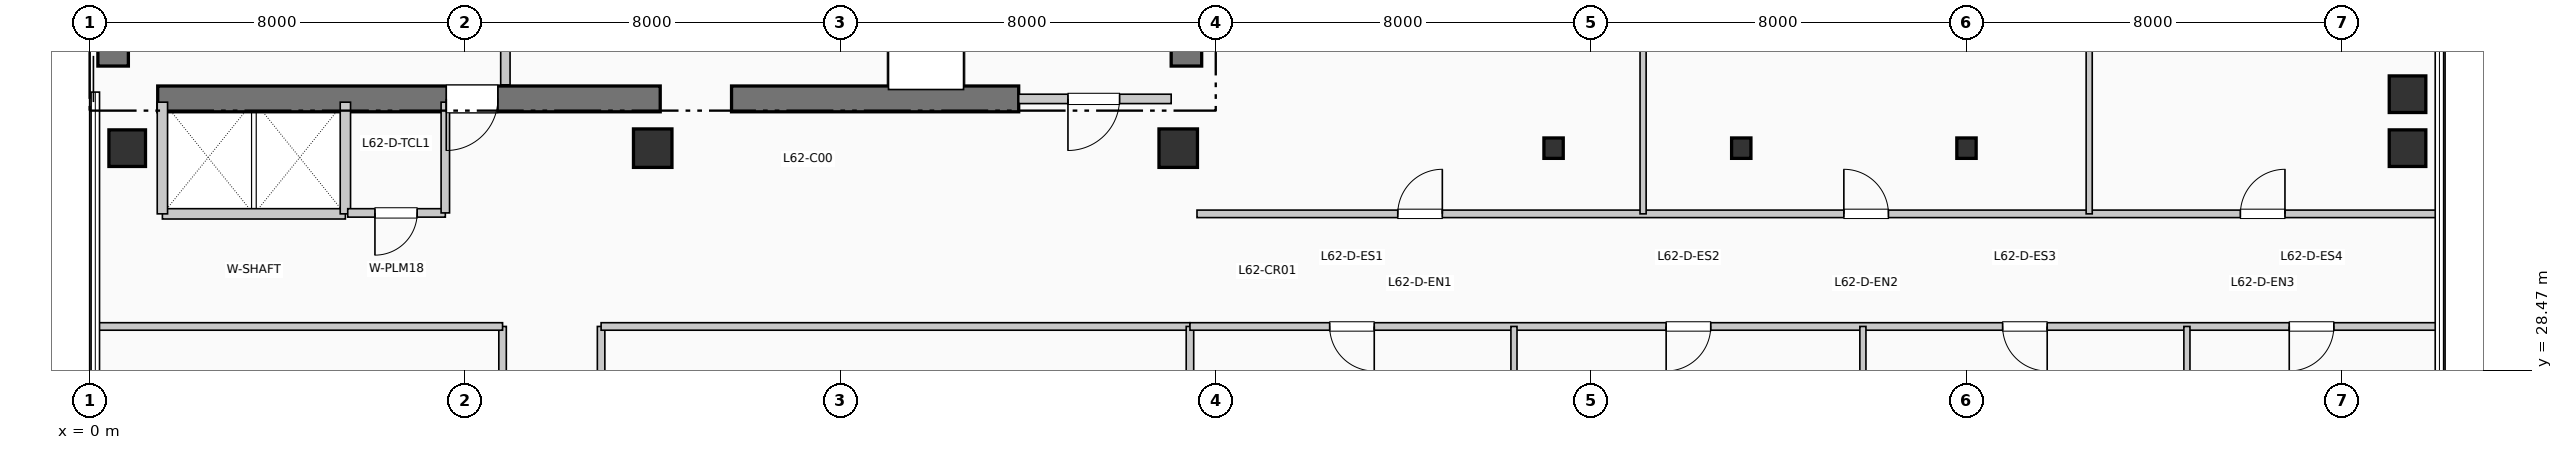
"""IFC4 building model, lengths in metres.
Left out: names, types, materials, properties, quantities, classifications, styles, units other than length and angle.
Written with IfcOpenShell. Run it as: python <this file> out.ifc"""

import sys

from ifc_helpers import new_model, si_unit, direction, frame, frame_2d, origin, origin_2d, place, context, subcontext, project, spatial, rectangle, i_section, extrude, element, fill, save


model = new_model("IFC4")
c1 = context("Model", 3, precision=1e-05, world=origin(), true_north=direction((0.0, 1.0)))
c2 = subcontext(c1, "Body", "Model", "MODEL_VIEW")
j1 = project(units=[si_unit("LENGTHUNIT", "METRE"), si_unit("PLANEANGLEUNIT", "RADIAN")], contexts=[c1])
p1 = place(None, origin())
s1 = spatial("IfcSite", under=j1, at=p1, CompositionType="ELEMENT")
p2 = place(p1, origin())
s2 = spatial("IfcBuilding", under=s1, at=p2, CompositionType="ELEMENT")
p3 = place(p2, frame((0.0, 0.0, 256.41)))
s3 = spatial("IfcBuildingStorey", under=s2, at=p3, CompositionType="ELEMENT", Elevation=256.41)
p4 = place(p3, frame((0.5, 34.95, 0.0), z_axis=(0.0, 0.0, 1.0), x_axis=(0.0, 1.0, 0.0)))
e1 = element("IfcWall", 1, at=p4, inside=s3, PredefinedType="SHEAR", context=c2, shape_type="SweptSolid", body=[
    extrude(rectangle(XDim=7.9, YDim=0.65, at=frame_2d((3.95, 0.0))), origin(), (0.0, 0.0, 1.0), 3.96),
])
p5 = place(p3, frame((23.375, 34.95, 0.0), z_axis=(0.0, 0.0, 1.0), x_axis=(0.0, 1.0, 0.0)))
e2 = element("IfcWall", 2, at=p5, inside=s3, PredefinedType="SHEAR", context=c2, shape_type="SweptSolid", body=[
    extrude(rectangle(XDim=10.64, YDim=0.65, at=frame_2d((5.32, 0.0))), origin(), (0.0, 0.0, 1.0), 3.96),
])
p6 = place(p3, frame((1.45, 34.25, 0.0), z_axis=(0.0, 0.0, 1.0), x_axis=(1.0, 0.0, 0.0)))
e3 = element("IfcWall", 3, at=p6, inside=s3, PredefinedType="SHEAR", context=c2, shape_type="SweptSolid", body=[
    extrude(rectangle(XDim=10.71, YDim=0.55, at=frame_2d((5.355, 0.0))), origin(), (0.0, 0.0, 1.0), 3.96),
])
p7 = place(p6, frame((7.25, 0.0, 0.0), z_axis=(0.0, 0.0, 1.0), x_axis=(-1.0, 0.0, 0.0)))
e4 = element("IfcOpeningElement", 4, at=p7, cuts=e3, PredefinedType="OPENING", context=c2, shape_type="SweptSolid", body=[
    extrude(rectangle(XDim=1.1, YDim=2.15, at=frame_2d((0.55, 1.075))), frame((0.0, 0.285, 0.0), z_axis=(0.0, -1.0, 0.0), x_axis=(1.0, 0.0, 0.0)), (0.0, 0.0, 1.0), 0.57),
])
p8 = place(p3, frame((13.68, 34.25, 0.0), z_axis=(0.0, 0.0, 1.0), x_axis=(1.0, 0.0, 0.0)))
e5 = element("IfcWall", 5, at=p8, inside=s3, PredefinedType="SHEAR", context=c2, shape_type="SweptSolid", body=[
    extrude(rectangle(XDim=6.12, YDim=0.55, at=frame_2d((3.06, 0.0))), origin(), (0.0, 0.0, 1.0), 3.96),
])
p9 = place(p3, frame((0.8, 33.2, 0.0), z_axis=(0.0, 0.0, 1.0), x_axis=(1.0, 0.0, 0.0)))
e6 = element("IfcColumn", 6, at=p9, inside=s3, PredefinedType="COLUMN", context=c2, shape_type="SweptSolid", body=[
    extrude(rectangle(XDim=0.78, YDim=0.78, at=origin_2d()), origin(), (0.0, 0.0, 1.0), 3.96),
])
for number, where, z_axis, x_axis in (
    (7, (12.0, 33.2, 0.0), (0.0, 0.0, 1.0), (1.0, 0.0, 0.0)),
    (8, (23.2, 33.2, 0.0), (0.0, 0.0, 1.0), (1.0, 0.0, 0.0)),
):
    element("IfcColumn", number, at=place(p3, frame(where, z_axis=z_axis, x_axis=x_axis)), inside=s3, PredefinedType="COLUMN", context=c2, shape_type="SweptSolid", body=[
        extrude(rectangle(XDim=0.82, YDim=0.82, at=origin_2d()), origin(), (0.0, 0.0, 1.0), 3.96),
    ])
for number, where, z_axis, x_axis in (
    (9, (31.2, 33.2, 0.0), (0.0, 0.0, 1.0), (1.0, 0.0, 0.0)),
    (10, (35.2, 33.2, 0.0), (0.0, 0.0, 1.0), (1.0, 0.0, 0.0)),
    (11, (40.0, 33.2, 0.0), (0.0, 0.0, 1.0), (1.0, 0.0, 0.0)),
):
    element("IfcColumn", number, at=place(p3, frame(where, z_axis=z_axis, x_axis=x_axis)), inside=s3, PredefinedType="COLUMN", context=c2, shape_type="SweptSolid", body=[
        extrude(i_section(OverallWidth=0.412, OverallDepth=0.435, WebThickness=0.027, FlangeThickness=0.043, at=origin_2d()), origin(), (0.0, 0.0, 1.0), 3.96),
    ])
for number, where, z_axis, x_axis in (
    (12, (49.4, 33.2, 0.0), (0.0, 0.0, 1.0), (1.0, 0.0, 0.0)),
    (13, (49.4, 34.35, 0.0), (0.0, 0.0, 1.0), (1.0, 0.0, 0.0)),
):
    element("IfcColumn", number, at=place(p3, frame(where, z_axis=z_axis, x_axis=x_axis)), inside=s3, PredefinedType="COLUMN", context=c2, shape_type="SweptSolid", body=[
        extrude(rectangle(XDim=0.78, YDim=0.78, at=origin_2d()), origin(), (0.0, 0.0, 1.0), 3.96),
    ])
p10 = place(p3, frame((8.86, 34.55, 0.0), z_axis=(0.0, 0.0, 1.0), x_axis=(0.0, 1.0, 0.0)))
e14 = element("IfcWall", 14, at=p10, inside=s3, PredefinedType="PARTITIONING", context=c2, shape_type="SweptSolid", body=[
    extrude(rectangle(XDim=2.5, YDim=0.2, at=frame_2d((1.25, 0.0))), origin(), (0.0, 0.0, 1.0), 3.71),
])
p11 = place(p3, frame((19.8, 34.25, 0.0), z_axis=(0.0, 0.0, 1.0), x_axis=(1.0, 0.0, 0.0)))
e15 = element("IfcWall", 15, at=p11, inside=s3, PredefinedType="PARTITIONING", context=c2, shape_type="SweptSolid", body=[
    extrude(rectangle(XDim=3.25, YDim=0.2, at=frame_2d((1.625, 0.0))), origin(), (0.0, 0.0, 1.0), 3.71),
])
p12 = place(p11, frame((2.15, 0.0, 0.0), z_axis=(0.0, 0.0, 1.0), x_axis=(-1.0, 0.0, 0.0)))
e16 = element("IfcOpeningElement", 16, at=p12, cuts=e15, PredefinedType="OPENING", context=c2, shape_type="SweptSolid", body=[
    extrude(rectangle(XDim=1.1, YDim=2.15, at=frame_2d((0.55, 1.075))), frame((0.0, 0.11, 0.0), z_axis=(0.0, -1.0, 0.0), x_axis=(1.0, 0.0, 0.0)), (0.0, 0.0, 1.0), 0.22),
])
p13 = place(p3, frame((1.55, 31.8, 0.0), z_axis=(0.0, 0.0, 1.0), x_axis=(1.0, 0.0, 0.0)))
e17 = element("IfcWall", 17, at=p13, inside=s3, PredefinedType="PARTITIONING", context=c2, shape_type="SweptSolid", body=[
    extrude(rectangle(XDim=3.9, YDim=0.22, at=frame_2d((1.95, 0.0))), origin(), (0.0, 0.0, 1.0), 3.71),
])
for number, where, z_axis, x_axis in (
    (18, (1.55, 31.8, 0.0), (0.0, 0.0, 1.0), (0.0, 1.0, 0.0)),
    (19, (5.45, 31.8, 0.0), (0.0, 0.0, 1.0), (0.0, 1.0, 0.0)),
):
    element("IfcWall", number, at=place(p3, frame(where, z_axis=z_axis, x_axis=x_axis)), inside=s3, PredefinedType="PARTITIONING", context=c2, shape_type="SweptSolid", body=[
        extrude(rectangle(XDim=2.38, YDim=0.22, at=frame_2d((1.19, 0.0))), origin(), (0.0, 0.0, 1.0), 3.71),
    ])
p14 = place(p3, frame((5.5, 31.82, 0.0), z_axis=(0.0, 0.0, 1.0), x_axis=(1.0, 0.0, 0.0)))
e20 = element("IfcWall", 20, at=p14, inside=s3, PredefinedType="PLUMBINGWALL", context=c2, shape_type="SweptSolid", body=[
    extrude(rectangle(XDim=2.08, YDim=0.18, at=frame_2d((1.04, 0.0))), origin(), (0.0, 0.0, 1.0), 3.71),
])
p15 = place(p14, frame((1.48, 0.0, 0.0), z_axis=(0.0, 0.0, 1.0), x_axis=(-1.0, 0.0, 0.0)))
e21 = element("IfcOpeningElement", 21, at=p15, cuts=e20, PredefinedType="OPENING", context=c2, shape_type="SweptSolid", body=[
    extrude(rectangle(XDim=0.9, YDim=2.1, at=frame_2d((0.45, 1.05))), frame((0.0, 0.1, 0.0), z_axis=(0.0, -1.0, 0.0), x_axis=(1.0, 0.0, 0.0)), (0.0, 0.0, 1.0), 0.2),
])
p16 = place(p3, frame((7.58, 31.82, 0.0), z_axis=(0.0, 0.0, 1.0), x_axis=(0.0, 1.0, 0.0)))
e22 = element("IfcWall", 22, at=p16, inside=s3, PredefinedType="PLUMBINGWALL", context=c2, shape_type="SweptSolid", body=[
    extrude(rectangle(XDim=2.36, YDim=0.18, at=frame_2d((1.18, 0.0))), origin(), (0.0, 0.0, 1.0), 3.71),
])
p17 = place(p3, frame((8.8, 10.4, 0.0), z_axis=(0.0, 0.0, 1.0), x_axis=(0.0, 1.0, 0.0)))
e23 = element("IfcWall", 23, at=p17, inside=s3, PredefinedType="PARTITIONING", context=c2, shape_type="SweptSolid", body=[
    extrude(rectangle(XDim=19.0, YDim=0.16, at=frame_2d((9.5, 0.0))), origin(), (0.0, 0.0, 1.0), 3.71),
])
p18 = place(p17, frame((4.275, 0.0, 0.0), z_axis=(0.0, 0.0, 1.0), x_axis=(-1.0, 0.0, 0.0)))
e24 = element("IfcOpeningElement", 24, at=p18, cuts=e23, PredefinedType="OPENING", context=c2, shape_type="SweptSolid", body=[
    extrude(rectangle(XDim=0.95, YDim=2.15, at=frame_2d((0.475, 1.075))), frame((0.0, 0.09, 0.0), z_axis=(0.0, -1.0, 0.0), x_axis=(1.0, 0.0, 0.0)), (0.0, 0.0, 1.0), 0.18),
])
p19 = place(p17, frame((11.305, 0.0, 0.0), z_axis=(0.0, 0.0, 1.0), x_axis=(-1.0, 0.0, 0.0)))
e25 = element("IfcOpeningElement", 25, at=p19, cuts=e23, PredefinedType="OPENING", context=c2, shape_type="SweptSolid", body=[
    extrude(rectangle(XDim=0.95, YDim=2.15, at=frame_2d((0.475, 1.075))), frame((0.0, 0.09, 0.0), z_axis=(0.0, -1.0, 0.0), x_axis=(1.0, 0.0, 0.0)), (0.0, 0.0, 1.0), 0.18),
])
p20 = place(p17, frame((17.005, 0.0, 0.0), z_axis=(0.0, 0.0, 1.0), x_axis=(-1.0, 0.0, 0.0)))
e26 = element("IfcOpeningElement", 26, at=p20, cuts=e23, PredefinedType="OPENING", context=c2, shape_type="SweptSolid", body=[
    extrude(rectangle(XDim=0.95, YDim=2.15, at=frame_2d((0.475, 1.075))), frame((0.0, 0.09, 0.0), z_axis=(0.0, -1.0, 0.0), x_axis=(1.0, 0.0, 0.0)), (0.0, 0.0, 1.0), 0.18),
])
p21 = place(p3, frame((10.9, 10.4, 0.0), z_axis=(0.0, 0.0, 1.0), x_axis=(0.0, 1.0, 0.0)))
e27 = element("IfcWall", 27, at=p21, inside=s3, PredefinedType="PARTITIONING", context=c2, shape_type="SweptSolid", body=[
    extrude(rectangle(XDim=19.0, YDim=0.16, at=frame_2d((9.5, 0.0))), origin(), (0.0, 0.0, 1.0), 3.71),
])
p22 = place(p21, frame((2.995, 0.0, 0.0)))
e28 = element("IfcOpeningElement", 28, at=p22, cuts=e27, PredefinedType="OPENING", context=c2, shape_type="SweptSolid", body=[
    extrude(rectangle(XDim=0.95, YDim=2.15, at=frame_2d((0.475, 1.075))), frame((0.0, 0.09, 0.0), z_axis=(0.0, -1.0, 0.0), x_axis=(1.0, 0.0, 0.0)), (0.0, 0.0, 1.0), 0.18),
])
p23 = place(p21, frame((6.505, 0.0, 0.0)))
e29 = element("IfcOpeningElement", 29, at=p23, cuts=e27, PredefinedType="OPENING", context=c2, shape_type="SweptSolid", body=[
    extrude(rectangle(XDim=0.95, YDim=2.15, at=frame_2d((0.475, 1.075))), frame((0.0, 0.09, 0.0), z_axis=(0.0, -1.0, 0.0), x_axis=(1.0, 0.0, 0.0)), (0.0, 0.0, 1.0), 0.18),
])
p24 = place(p21, frame((14.535, 0.0, 0.0)))
e30 = element("IfcOpeningElement", 30, at=p24, cuts=e27, PredefinedType="OPENING", context=c2, shape_type="SweptSolid", body=[
    extrude(rectangle(XDim=0.95, YDim=2.15, at=frame_2d((0.475, 1.075))), frame((0.0, 0.09, 0.0), z_axis=(0.0, -1.0, 0.0), x_axis=(1.0, 0.0, 0.0)), (0.0, 0.0, 1.0), 0.18),
])
p25 = place(p3, frame((0.19, 29.4, 0.0), z_axis=(0.0, 0.0, 1.0), x_axis=(1.0, 0.0, 0.0)))
e31 = element("IfcWall", 31, at=p25, inside=s3, PredefinedType="PARTITIONING", context=c2, shape_type="SweptSolid", body=[
    extrude(rectangle(XDim=8.61, YDim=0.16, at=frame_2d((4.305, 0.0))), origin(), (0.0, 0.0, 1.0), 3.365),
])
p26 = place(p3, frame((10.9, 29.4, 0.0), z_axis=(0.0, 0.0, 1.0), x_axis=(1.0, 0.0, 0.0)))
e32 = element("IfcWall", 32, at=p26, inside=s3, PredefinedType="PARTITIONING", context=c2, shape_type="SweptSolid", body=[
    extrude(rectangle(XDim=12.55, YDim=0.16, at=frame_2d((6.275, 0.0))), origin(), (0.0, 0.0, 1.0), 3.365),
])
p27 = place(p3, frame((23.45, 5.99, 0.0), z_axis=(0.0, 0.0, 1.0), x_axis=(0.0, 1.0, 0.0)))
e33 = element("IfcWall", 33, at=p27, inside=s3, PredefinedType="PARTITIONING", context=c2, shape_type="SweptSolid", body=[
    extrude(rectangle(XDim=23.41, YDim=0.16, at=frame_2d((11.705, 0.0))), origin(), (0.0, 0.0, 1.0), 3.095),
])
p28 = place(p3, frame((23.45, 29.4, 0.0), z_axis=(0.0, 0.0, 1.0), x_axis=(1.0, 0.0, 0.0)))
e34 = element("IfcWall", 34, at=p28, inside=s3, PredefinedType="PARTITIONING", context=c2, shape_type="SweptSolid", body=[
    extrude(rectangle(XDim=26.56, YDim=0.16, at=frame_2d((13.28, 0.0))), origin(), (0.0, 0.0, 1.0), 3.365),
])
p29 = place(p28, frame((3.928, 0.0, 0.0), z_axis=(0.0, 0.0, 1.0), x_axis=(-1.0, 0.0, 0.0)))
e35 = element("IfcOpeningElement", 35, at=p29, cuts=e34, PredefinedType="OPENING", context=c2, shape_type="SweptSolid", body=[
    extrude(rectangle(XDim=0.95, YDim=2.15, at=frame_2d((0.475, 1.075))), frame((0.0, 0.09, 0.0), z_axis=(0.0, -1.0, 0.0), x_axis=(1.0, 0.0, 0.0)), (0.0, 0.0, 1.0), 0.18),
])
p30 = place(p28, frame((11.099, 0.0, 0.0), z_axis=(0.0, 0.0, 1.0), x_axis=(-1.0, 0.0, 0.0)))
e36 = element("IfcOpeningElement", 36, at=p30, cuts=e34, PredefinedType="OPENING", context=c2, shape_type="SweptSolid", body=[
    extrude(rectangle(XDim=0.95, YDim=2.15, at=frame_2d((0.475, 1.075))), frame((0.0, 0.09, 0.0), z_axis=(0.0, -1.0, 0.0), x_axis=(1.0, 0.0, 0.0)), (0.0, 0.0, 1.0), 0.18),
])
p31 = place(p28, frame((18.27, 0.0, 0.0), z_axis=(0.0, 0.0, 1.0), x_axis=(-1.0, 0.0, 0.0)))
e37 = element("IfcOpeningElement", 37, at=p31, cuts=e34, PredefinedType="OPENING", context=c2, shape_type="SweptSolid", body=[
    extrude(rectangle(XDim=0.95, YDim=2.15, at=frame_2d((0.475, 1.075))), frame((0.0, 0.09, 0.0), z_axis=(0.0, -1.0, 0.0), x_axis=(1.0, 0.0, 0.0)), (0.0, 0.0, 1.0), 0.18),
])
p32 = place(p28, frame((24.379, 0.0, 0.0), z_axis=(0.0, 0.0, 1.0), x_axis=(-1.0, 0.0, 0.0)))
e38 = element("IfcOpeningElement", 38, at=p32, cuts=e34, PredefinedType="OPENING", context=c2, shape_type="SweptSolid", body=[
    extrude(rectangle(XDim=0.95, YDim=2.15, at=frame_2d((0.475, 1.075))), frame((0.0, 0.09, 0.0), z_axis=(0.0, -1.0, 0.0), x_axis=(1.0, 0.0, 0.0)), (0.0, 0.0, 1.0), 0.18),
])
p33 = place(p3, frame((23.6, 31.8, 0.0), z_axis=(0.0, 0.0, 1.0), x_axis=(1.0, 0.0, 0.0)))
e39 = element("IfcWall", 39, at=p33, inside=s3, PredefinedType="PARTITIONING", context=c2, shape_type="SweptSolid", body=[
    extrude(rectangle(XDim=26.41, YDim=0.16, at=frame_2d((13.205, 0.0))), origin(), (0.0, 0.0, 1.0), 3.71),
])
p34 = place(p33, frame((4.279, 0.0, 0.0)))
e40 = element("IfcOpeningElement", 40, at=p34, cuts=e39, PredefinedType="OPENING", context=c2, shape_type="SweptSolid", body=[
    extrude(rectangle(XDim=0.95, YDim=2.15, at=frame_2d((0.475, 1.075))), frame((0.0, 0.09, 0.0), z_axis=(0.0, -1.0, 0.0), x_axis=(1.0, 0.0, 0.0)), (0.0, 0.0, 1.0), 0.18),
])
p35 = place(p33, frame((13.786, 0.0, 0.0)))
e41 = element("IfcOpeningElement", 41, at=p35, cuts=e39, PredefinedType="OPENING", context=c2, shape_type="SweptSolid", body=[
    extrude(rectangle(XDim=0.95, YDim=2.15, at=frame_2d((0.475, 1.075))), frame((0.0, 0.09, 0.0), z_axis=(0.0, -1.0, 0.0), x_axis=(1.0, 0.0, 0.0)), (0.0, 0.0, 1.0), 0.18),
])
p36 = place(p33, frame((22.238, 0.0, 0.0)))
e42 = element("IfcOpeningElement", 42, at=p36, cuts=e39, PredefinedType="OPENING", context=c2, shape_type="SweptSolid", body=[
    extrude(rectangle(XDim=0.95, YDim=2.15, at=frame_2d((0.475, 1.075))), frame((0.0, 0.09, 0.0), z_axis=(0.0, -1.0, 0.0), x_axis=(1.0, 0.0, 0.0)), (0.0, 0.0, 1.0), 0.18),
])
for number, where, z_axis, x_axis in (
    (43, (30.356, 22.19, 0.0), (0.0, 0.0, 1.0), (0.0, 1.0, 0.0)),
    (44, (37.792, 22.19, 0.0), (0.0, 0.0, 1.0), (0.0, 1.0, 0.0)),
    (45, (44.698, 22.19, 0.0), (0.0, 0.0, 1.0), (0.0, 1.0, 0.0)),
):
    element("IfcWall", number, at=place(p3, frame(where, z_axis=z_axis, x_axis=x_axis)), inside=s3, PredefinedType="PARTITIONING", context=c2, shape_type="SweptSolid", body=[
        extrude(rectangle(XDim=7.21, YDim=0.13, at=frame_2d((3.605, 0.0))), origin(), (0.0, 0.0, 1.0), 3.71),
    ])
for number, where, z_axis, x_axis in (
    (46, (33.108, 31.8, 0.0), (0.0, 0.0, 1.0), (0.0, 1.0, 0.0)),
    (47, (42.615, 31.8, 0.0), (0.0, 0.0, 1.0), (0.0, 1.0, 0.0)),
):
    element("IfcWall", number, at=place(p3, frame(where, z_axis=z_axis, x_axis=x_axis)), inside=s3, PredefinedType="PARTITIONING", context=c2, shape_type="SweptSolid", body=[
        extrude(rectangle(XDim=14.01, YDim=0.13, at=frame_2d((7.005, 0.0))), origin(), (0.0, 0.0, 1.0), 3.71),
    ])
p37 = place(p7, origin())
e48 = element("IfcDoor", 48, at=p37, inside=s3, OperationType="SINGLE_SWING_LEFT", PredefinedType="DOOR", context=c2, shape_type="SweptSolid", body=[
    extrude(rectangle(XDim=1.1, YDim=2.15, at=frame_2d((0.55, 1.075))), frame((0.0, 0.025, 0.0), z_axis=(0.0, -1.0, 0.0), x_axis=(1.0, 0.0, 0.0)), (0.0, 0.0, 1.0), 0.05),
])
fill(e4, e48)
p38 = place(p12, origin())
e49 = element("IfcDoor", 49, at=p38, inside=s3, OperationType="SINGLE_SWING_LEFT", PredefinedType="DOOR", context=c2, shape_type="SweptSolid", body=[
    extrude(rectangle(XDim=1.1, YDim=2.15, at=frame_2d((0.55, 1.075))), frame((0.0, 0.025, 0.0), z_axis=(0.0, -1.0, 0.0), x_axis=(1.0, 0.0, 0.0)), (0.0, 0.0, 1.0), 0.05),
])
fill(e16, e49)
p39 = place(p15, origin())
e50 = element("IfcDoor", 50, at=p39, inside=s3, OperationType="SINGLE_SWING_LEFT", PredefinedType="DOOR", context=c2, shape_type="SweptSolid", body=[
    extrude(rectangle(XDim=0.9, YDim=2.1, at=frame_2d((0.45, 1.05))), frame((0.0, 0.025, 0.0), z_axis=(0.0, -1.0, 0.0), x_axis=(1.0, 0.0, 0.0)), (0.0, 0.0, 1.0), 0.05),
])
fill(e21, e50)
p40 = place(p29, origin())
e51 = element("IfcDoor", 51, at=p40, inside=s3, OperationType="SINGLE_SWING_RIGHT", PredefinedType="DOOR", context=c2, shape_type="SweptSolid", body=[
    extrude(rectangle(XDim=0.95, YDim=2.15, at=frame_2d((0.475, 1.075))), frame((0.0, 0.025, 0.0), z_axis=(0.0, -1.0, 0.0), x_axis=(1.0, 0.0, 0.0)), (0.0, 0.0, 1.0), 0.05),
])
fill(e35, e51)
p41 = place(p30, origin())
e52 = element("IfcDoor", 52, at=p41, inside=s3, OperationType="SINGLE_SWING_LEFT", PredefinedType="DOOR", context=c2, shape_type="SweptSolid", body=[
    extrude(rectangle(XDim=0.95, YDim=2.15, at=frame_2d((0.475, 1.075))), frame((0.0, 0.025, 0.0), z_axis=(0.0, -1.0, 0.0), x_axis=(1.0, 0.0, 0.0)), (0.0, 0.0, 1.0), 0.05),
])
fill(e36, e52)
p42 = place(p31, origin())
e53 = element("IfcDoor", 53, at=p42, inside=s3, OperationType="SINGLE_SWING_RIGHT", PredefinedType="DOOR", context=c2, shape_type="SweptSolid", body=[
    extrude(rectangle(XDim=0.95, YDim=2.15, at=frame_2d((0.475, 1.075))), frame((0.0, 0.025, 0.0), z_axis=(0.0, -1.0, 0.0), x_axis=(1.0, 0.0, 0.0)), (0.0, 0.0, 1.0), 0.05),
])
fill(e37, e53)
p43 = place(p32, origin())
e54 = element("IfcDoor", 54, at=p43, inside=s3, OperationType="SINGLE_SWING_LEFT", PredefinedType="DOOR", context=c2, shape_type="SweptSolid", body=[
    extrude(rectangle(XDim=0.95, YDim=2.15, at=frame_2d((0.475, 1.075))), frame((0.0, 0.025, 0.0), z_axis=(0.0, -1.0, 0.0), x_axis=(1.0, 0.0, 0.0)), (0.0, 0.0, 1.0), 0.05),
])
fill(e38, e54)
p44 = place(p34, origin())
e55 = element("IfcDoor", 55, at=p44, inside=s3, OperationType="SINGLE_SWING_RIGHT", PredefinedType="DOOR", context=c2, shape_type="SweptSolid", body=[
    extrude(rectangle(XDim=0.95, YDim=2.15, at=frame_2d((0.475, 1.075))), frame((0.0, 0.025, 0.0), z_axis=(0.0, -1.0, 0.0), x_axis=(1.0, 0.0, 0.0)), (0.0, 0.0, 1.0), 0.05),
])
fill(e40, e55)
p45 = place(p35, origin())
e56 = element("IfcDoor", 56, at=p45, inside=s3, OperationType="SINGLE_SWING_LEFT", PredefinedType="DOOR", context=c2, shape_type="SweptSolid", body=[
    extrude(rectangle(XDim=0.95, YDim=2.15, at=frame_2d((0.475, 1.075))), frame((0.0, 0.025, 0.0), z_axis=(0.0, -1.0, 0.0), x_axis=(1.0, 0.0, 0.0)), (0.0, 0.0, 1.0), 0.05),
])
fill(e41, e56)
p46 = place(p36, origin())
e57 = element("IfcDoor", 57, at=p46, inside=s3, OperationType="SINGLE_SWING_RIGHT", PredefinedType="DOOR", context=c2, shape_type="SweptSolid", body=[
    extrude(rectangle(XDim=0.95, YDim=2.15, at=frame_2d((0.475, 1.075))), frame((0.0, 0.025, 0.0), z_axis=(0.0, -1.0, 0.0), x_axis=(1.0, 0.0, 0.0)), (0.0, 0.0, 1.0), 0.05),
])
fill(e42, e57)
save(model, sys.argv[1])
